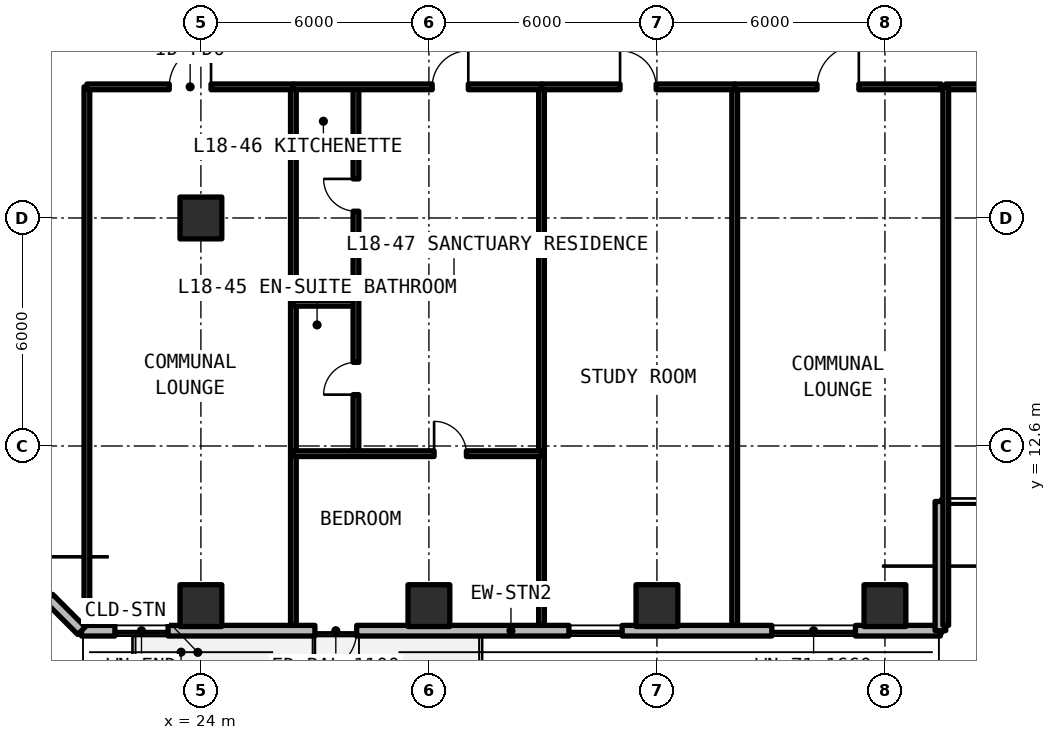
"""IFC4 building model, lengths in metres.
Left out: names, types, materials, properties, quantities, classifications, styles, units other than length and angle.
Written with IfcOpenShell. Run it as: python <this file> out.ifc"""

import sys

from ifc_helpers import new_model, si_unit, direction, frame, frame_2d, origin, origin_2d, place, context, subcontext, project, spatial, rectangle, extrude, element, fill, save


model = new_model("IFC4")
c1 = context("Model", 3, precision=1e-05, world=origin(), true_north=direction((0.0, 1.0)))
c2 = subcontext(c1, "Body", "Model", "MODEL_VIEW")
j1 = project(units=[si_unit("LENGTHUNIT", "METRE"), si_unit("PLANEANGLEUNIT", "RADIAN")], contexts=[c1])
p1 = place(None, origin())
s1 = spatial("IfcSite", under=j1, at=p1, CompositionType="ELEMENT")
p2 = place(p1, origin())
s2 = spatial("IfcBuilding", under=s1, at=p2, CompositionType="ELEMENT")
p3 = place(p2, frame((0.0, 0.0, 66.0)))
s3 = spatial("IfcBuildingStorey", under=s2, at=p3, CompositionType="ELEMENT", Elevation=66.0)
for number, where, z_axis, x_axis in (
    (1, (24.0, 18.6, 0.0), (0.0, 0.0, 1.0), (1.0, 0.0, 0.0)),
    (2, (24.0, 8.4, 0.0), (0.0, 0.0, 1.0), (1.0, 0.0, 0.0)),
    (3, (30.0, 8.4, 0.0), (0.0, 0.0, 1.0), (1.0, 0.0, 0.0)),
    (4, (36.0, 8.4, 0.0), (0.0, 0.0, 1.0), (1.0, 0.0, 0.0)),
    (5, (42.0, 8.4, 0.0), (0.0, 0.0, 1.0), (1.0, 0.0, 0.0)),
):
    element("IfcColumn", number, at=place(p3, frame(where, z_axis=z_axis, x_axis=x_axis)), inside=s3, PredefinedType="COLUMN", context=c2, shape_type="SweptSolid", body=[
        extrude(rectangle(XDim=1.1, YDim=1.1, at=origin_2d()), origin(), (0.0, 0.0, 1.0), 3.63),
    ])
p4 = place(p3, frame((20.858, 7.74, 0.0), z_axis=(0.0, 0.0, 1.0), x_axis=(1.0, 0.0, 0.0)))
e6 = element("IfcWall", 6, at=p4, inside=s3, PredefinedType="SOLIDWALL", context=c2, shape_type="SweptSolid", body=[
    extrude(rectangle(XDim=22.602, YDim=0.28, at=frame_2d((11.301, 0.0))), origin(), (0.0, 0.0, 1.0), 3.41),
])
p5 = place(p4, frame((6.142, 0.0, 0.0)))
e7 = element("IfcOpeningElement", 7, at=p5, cuts=e6, PredefinedType="OPENING", context=c2, shape_type="SweptSolid", body=[
    extrude(rectangle(XDim=1.1, YDim=2.15, at=frame_2d((0.55, 1.075))), frame((0.0, 0.15, 0.0), z_axis=(0.0, -1.0, 0.0), x_axis=(1.0, 0.0, 0.0)), (0.0, 0.0, 1.0), 0.3),
])
p6 = place(p4, frame((0.879, 0.0, 0.78)))
e8 = element("IfcOpeningElement", 8, at=p6, cuts=e6, PredefinedType="OPENING", context=c2, shape_type="SweptSolid", body=[
    extrude(rectangle(XDim=1.4, YDim=1.65, at=frame_2d((0.7, 0.825))), frame((0.0, 0.15, 0.0), z_axis=(0.0, -1.0, 0.0), x_axis=(1.0, 0.0, 0.0)), (0.0, 0.0, 1.0), 0.3),
])
p7 = place(p4, frame((12.827, 0.0, 0.78)))
e9 = element("IfcOpeningElement", 9, at=p7, cuts=e6, PredefinedType="OPENING", context=c2, shape_type="SweptSolid", body=[
    extrude(rectangle(XDim=1.4, YDim=1.65, at=frame_2d((0.7, 0.825))), frame((0.0, 0.15, 0.0), z_axis=(0.0, -1.0, 0.0), x_axis=(1.0, 0.0, 0.0)), (0.0, 0.0, 1.0), 0.3),
])
p8 = place(p4, frame((18.165, 0.0, 0.78)))
e10 = element("IfcOpeningElement", 10, at=p8, cuts=e6, PredefinedType="OPENING", context=c2, shape_type="SweptSolid", body=[
    extrude(rectangle(XDim=2.2, YDim=1.66, at=frame_2d((1.1, 0.83))), frame((0.0, 0.15, 0.0), z_axis=(0.0, -1.0, 0.0), x_axis=(1.0, 0.0, 0.0)), (0.0, 0.0, 1.0), 0.3),
])
p9 = place(p3, frame((43.46, 7.74, 0.0), z_axis=(0.0, 0.0, 1.0), x_axis=(0.0, 1.0, 0.0)))
e11 = element("IfcWall", 11, at=p9, inside=s3, PredefinedType="SOLIDWALL", context=c2, shape_type="SweptSolid", body=[
    extrude(rectangle(XDim=3.4, YDim=0.28, at=frame_2d((1.7, 0.0))), origin(), (0.0, 0.0, 1.0), 3.41),
])
p10 = place(p3, frame((16.74, 11.858, 0.0), z_axis=(0.0, 0.0, 1.0), x_axis=(0.707106781187, -0.707106781187, 0.0)))
e12 = element("IfcWall", 12, at=p10, inside=s3, PredefinedType="SOLIDWALL", context=c2, shape_type="SweptSolid", body=[
    extrude(rectangle(XDim=5.824, YDim=0.28, at=frame_2d((2.912, 0.0))), origin(), (0.0, 0.0, 1.0), 3.41),
])
p11 = place(p10, frame((1.212, 0.0, 0.78)))
e13 = element("IfcOpeningElement", 13, at=p11, cuts=e12, PredefinedType="OPENING", context=c2, shape_type="SweptSolid", body=[
    extrude(rectangle(XDim=3.4, YDim=1.66, at=frame_2d((1.7, 0.83))), frame((0.0, 0.15, 0.0), z_axis=(0.0, -1.0, 0.0), x_axis=(1.0, 0.0, 0.0)), (0.0, 0.0, 1.0), 0.3),
])
p12 = place(p3, frame((43.6, 22.05, 0.0), z_axis=(0.0, 0.0, 1.0), x_axis=(1.0, 0.0, 0.0)))
e14 = element("IfcWall", 14, at=p12, inside=s3, PredefinedType="SOLIDWALL", context=c2, shape_type="SweptSolid", body=[
    extrude(rectangle(XDim=8.4, YDim=0.15, at=frame_2d((4.2, 0.0))), origin(), (0.0, 0.0, 1.0), 2.63),
])
p13 = place(p12, frame((3.65, 0.0, 0.0)))
e15 = element("IfcOpeningElement", 15, at=p13, cuts=e14, PredefinedType="OPENING", context=c2, shape_type="SweptSolid", body=[
    extrude(rectangle(XDim=1.1, YDim=2.15, at=frame_2d((0.55, 1.075))), frame((0.0, 0.085, 0.0), z_axis=(0.0, -1.0, 0.0), x_axis=(1.0, 0.0, 0.0)), (0.0, 0.0, 1.0), 0.17),
])
for number, where, z_axis, x_axis in (
    (16, (43.6, 7.88, 0.0), (0.0, 0.0, 1.0), (0.0, 1.0, 0.0)),
    (17, (21.0, 7.88, 0.0), (0.0, 0.0, 1.0), (0.0, 1.0, 0.0)),
    (18, (26.434, 7.88, 0.0), (0.0, 0.0, 1.0), (0.0, 1.0, 0.0)),
):
    element("IfcWall", number, at=place(p3, frame(where, z_axis=z_axis, x_axis=x_axis)), inside=s3, PredefinedType="SOLIDWALL", context=c2, shape_type="SweptSolid", body=[
        extrude(rectangle(XDim=14.17, YDim=0.15, at=frame_2d((7.085, 0.0))), origin(), (0.0, 0.0, 1.0), 2.63),
    ])
p14 = place(p3, frame((21.0, 22.05, 0.0), z_axis=(0.0, 0.0, 1.0), x_axis=(1.0, 0.0, 0.0)))
e19 = element("IfcWall", 19, at=p14, inside=s3, PredefinedType="SOLIDWALL", context=c2, shape_type="SweptSolid", body=[
    extrude(rectangle(XDim=5.434, YDim=0.15, at=frame_2d((2.717, 0.0))), origin(), (0.0, 0.0, 1.0), 2.63),
])
p15 = place(p14, frame((2.167, 0.0, 0.0)))
e20 = element("IfcOpeningElement", 20, at=p15, cuts=e19, PredefinedType="OPENING", context=c2, shape_type="SweptSolid", body=[
    extrude(rectangle(XDim=1.1, YDim=2.15, at=frame_2d((0.55, 1.075))), frame((0.0, 0.085, 0.0), z_axis=(0.0, -1.0, 0.0), x_axis=(1.0, 0.0, 0.0)), (0.0, 0.0, 1.0), 0.17),
])
p16 = place(p3, frame((32.963, 7.88, 0.0), z_axis=(0.0, 0.0, 1.0), x_axis=(0.0, 1.0, 0.0)))
e21 = element("IfcWall", 21, at=p16, inside=s3, PredefinedType="SOLIDWALL", context=c2, shape_type="SweptSolid", body=[
    extrude(rectangle(XDim=14.17, YDim=0.15, at=frame_2d((7.085, 0.0))), origin(), (0.0, 0.0, 1.0), 2.63),
])
p17 = place(p3, frame((26.434, 16.355, 0.0), z_axis=(0.0, 0.0, 1.0), x_axis=(1.0, 0.0, 0.0)))
e22 = element("IfcWall", 22, at=p17, inside=s3, PredefinedType="PARTITIONING", context=c2, shape_type="SweptSolid", body=[
    extrude(rectangle(XDim=1.646, YDim=0.15, at=frame_2d((0.823, 0.0))), origin(), (0.0, 0.0, 1.0), 2.63),
])
p18 = place(p3, frame((28.08, 12.398, 0.0), z_axis=(0.0, 0.0, 1.0), x_axis=(0.0, 1.0, 0.0)))
e23 = element("IfcWall", 23, at=p18, inside=s3, PredefinedType="PARTITIONING", context=c2, shape_type="SweptSolid", body=[
    extrude(rectangle(XDim=9.652, YDim=0.15, at=frame_2d((4.826, 0.0))), origin(), (0.0, 0.0, 1.0), 2.63),
])
p19 = place(p18, frame((1.554, 0.0, 0.0)))
e24 = element("IfcOpeningElement", 24, at=p19, cuts=e23, PredefinedType="OPENING", context=c2, shape_type="SweptSolid", body=[
    extrude(rectangle(XDim=0.85, YDim=2.1, at=frame_2d((0.425, 1.05))), frame((0.0, 0.085, 0.0), z_axis=(0.0, -1.0, 0.0), x_axis=(1.0, 0.0, 0.0)), (0.0, 0.0, 1.0), 0.17),
])
p20 = place(p18, frame((6.38, 0.0, 0.0)))
e25 = element("IfcOpeningElement", 25, at=p20, cuts=e23, PredefinedType="OPENING", context=c2, shape_type="SweptSolid", body=[
    extrude(rectangle(XDim=0.85, YDim=2.1, at=frame_2d((0.425, 1.05))), frame((0.0, 0.085, 0.0), z_axis=(0.0, -1.0, 0.0), x_axis=(1.0, 0.0, 0.0)), (0.0, 0.0, 1.0), 0.17),
])
p21 = place(p3, frame((26.434, 12.398, 0.0), z_axis=(0.0, 0.0, 1.0), x_axis=(1.0, 0.0, 0.0)))
e26 = element("IfcWall", 26, at=p21, inside=s3, PredefinedType="PARTITIONING", context=c2, shape_type="SweptSolid", body=[
    extrude(rectangle(XDim=6.529, YDim=0.15, at=frame_2d((3.265, 0.0))), origin(), (0.0, 0.0, 1.0), 2.63),
])
p22 = place(p21, frame((3.703, 0.0, 0.0)))
e27 = element("IfcOpeningElement", 27, at=p22, cuts=e26, PredefinedType="OPENING", context=c2, shape_type="SweptSolid", body=[
    extrude(rectangle(XDim=0.85, YDim=2.1, at=frame_2d((0.425, 1.05))), frame((0.0, 0.085, 0.0), z_axis=(0.0, -1.0, 0.0), x_axis=(1.0, 0.0, 0.0)), (0.0, 0.0, 1.0), 0.17),
])
p23 = place(p3, frame((26.434, 22.05, 0.0), z_axis=(0.0, 0.0, 1.0), x_axis=(1.0, 0.0, 0.0)))
e28 = element("IfcWall", 28, at=p23, inside=s3, PredefinedType="SOLIDWALL", context=c2, shape_type="SweptSolid", body=[
    extrude(rectangle(XDim=6.529, YDim=0.15, at=frame_2d((3.265, 0.0))), origin(), (0.0, 0.0, 1.0), 2.63),
])
p24 = place(p23, frame((3.653, 0.0, 0.0)))
e29 = element("IfcOpeningElement", 29, at=p24, cuts=e28, PredefinedType="OPENING", context=c2, shape_type="SweptSolid", body=[
    extrude(rectangle(XDim=0.95, YDim=2.15, at=frame_2d((0.475, 1.075))), frame((0.0, 0.085, 0.0), z_axis=(0.0, -1.0, 0.0), x_axis=(1.0, 0.0, 0.0)), (0.0, 0.0, 1.0), 0.17),
])
p25 = place(p3, frame((38.046, 7.88, 0.0), z_axis=(0.0, 0.0, 1.0), x_axis=(0.0, 1.0, 0.0)))
e30 = element("IfcWall", 30, at=p25, inside=s3, PredefinedType="SOLIDWALL", context=c2, shape_type="SweptSolid", body=[
    extrude(rectangle(XDim=14.17, YDim=0.15, at=frame_2d((7.085, 0.0))), origin(), (0.0, 0.0, 1.0), 2.63),
])
p26 = place(p3, frame((32.963, 22.05, 0.0), z_axis=(0.0, 0.0, 1.0), x_axis=(1.0, 0.0, 0.0)))
e31 = element("IfcWall", 31, at=p26, inside=s3, PredefinedType="SOLIDWALL", context=c2, shape_type="SweptSolid", body=[
    extrude(rectangle(XDim=5.083, YDim=0.15, at=frame_2d((2.542, 0.0))), origin(), (0.0, 0.0, 1.0), 2.63),
])
p27 = place(p26, frame((2.067, 0.0, 0.0)))
e32 = element("IfcOpeningElement", 32, at=p27, cuts=e31, PredefinedType="OPENING", context=c2, shape_type="SweptSolid", body=[
    extrude(rectangle(XDim=0.95, YDim=2.15, at=frame_2d((0.475, 1.075))), frame((0.0, 0.085, 0.0), z_axis=(0.0, -1.0, 0.0), x_axis=(1.0, 0.0, 0.0)), (0.0, 0.0, 1.0), 0.17),
])
p28 = place(p3, frame((38.046, 22.05, 0.0), z_axis=(0.0, 0.0, 1.0), x_axis=(1.0, 0.0, 0.0)))
e33 = element("IfcWall", 33, at=p28, inside=s3, PredefinedType="SOLIDWALL", context=c2, shape_type="SweptSolid", body=[
    extrude(rectangle(XDim=5.434, YDim=0.15, at=frame_2d((2.717, 0.0))), origin(), (0.0, 0.0, 1.0), 2.63),
])
p29 = place(p28, frame((2.167, 0.0, 0.0)))
e34 = element("IfcOpeningElement", 34, at=p29, cuts=e33, PredefinedType="OPENING", context=c2, shape_type="SweptSolid", body=[
    extrude(rectangle(XDim=1.1, YDim=2.15, at=frame_2d((0.55, 1.075))), frame((0.0, 0.085, 0.0), z_axis=(0.0, -1.0, 0.0), x_axis=(1.0, 0.0, 0.0)), (0.0, 0.0, 1.0), 0.17),
])
p30 = place(p5, frame((1.1, 0.0, 0.0), z_axis=(0.0, 0.0, 1.0), x_axis=(-1.0, 0.0, 0.0)))
e35 = element("IfcDoor", 35, at=p30, inside=s3, OperationType="SINGLE_SWING_RIGHT", PredefinedType="DOOR", context=c2, shape_type="SweptSolid", body=[
    extrude(rectangle(XDim=1.1, YDim=2.15, at=frame_2d((0.55, 1.075))), frame((0.0, 0.025, 0.0), z_axis=(0.0, -1.0, 0.0), x_axis=(1.0, 0.0, 0.0)), (0.0, 0.0, 1.0), 0.05),
])
fill(e7, e35)
p31 = place(p6, origin())
e36 = element("IfcWindow", 36, at=p31, inside=s3, PartitioningType="SINGLE_PANEL", PredefinedType="WINDOW", context=c2, shape_type="SweptSolid", body=[
    extrude(rectangle(XDim=1.4, YDim=1.65, at=frame_2d((0.7, 0.825))), frame((0.0, 0.03, 0.0), z_axis=(0.0, -1.0, 0.0), x_axis=(1.0, 0.0, 0.0)), (0.0, 0.0, 1.0), 0.06),
])
fill(e8, e36)
p32 = place(p7, origin())
e37 = element("IfcWindow", 37, at=p32, inside=s3, PartitioningType="SINGLE_PANEL", PredefinedType="WINDOW", context=c2, shape_type="SweptSolid", body=[
    extrude(rectangle(XDim=1.4, YDim=1.65, at=frame_2d((0.7, 0.825))), frame((0.0, 0.03, 0.0), z_axis=(0.0, -1.0, 0.0), x_axis=(1.0, 0.0, 0.0)), (0.0, 0.0, 1.0), 0.06),
])
fill(e9, e37)
p33 = place(p8, origin())
e38 = element("IfcWindow", 38, at=p33, inside=s3, PartitioningType="SINGLE_PANEL", PredefinedType="WINDOW", context=c2, shape_type="SweptSolid", body=[
    extrude(rectangle(XDim=2.2, YDim=1.66, at=frame_2d((1.1, 0.83))), frame((0.0, 0.03, 0.0), z_axis=(0.0, -1.0, 0.0), x_axis=(1.0, 0.0, 0.0)), (0.0, 0.0, 1.0), 0.06),
])
fill(e10, e38)
p34 = place(p15, origin())
e39 = element("IfcDoor", 39, at=p34, inside=s3, OperationType="SINGLE_SWING_RIGHT", PredefinedType="DOOR", context=c2, shape_type="SweptSolid", body=[
    extrude(rectangle(XDim=1.1, YDim=2.15, at=frame_2d((0.55, 1.075))), frame((0.0, 0.025, 0.0), z_axis=(0.0, -1.0, 0.0), x_axis=(1.0, 0.0, 0.0)), (0.0, 0.0, 1.0), 0.05),
])
fill(e20, e39)
p35 = place(p19, origin())
e40 = element("IfcDoor", 40, at=p35, inside=s3, OperationType="SINGLE_SWING_LEFT", PredefinedType="DOOR", context=c2, shape_type="SweptSolid", body=[
    extrude(rectangle(XDim=0.85, YDim=2.1, at=frame_2d((0.425, 1.05))), frame((0.0, 0.025, 0.0), z_axis=(0.0, -1.0, 0.0), x_axis=(1.0, 0.0, 0.0)), (0.0, 0.0, 1.0), 0.05),
])
fill(e24, e40)
p36 = place(p20, origin())
e41 = element("IfcDoor", 41, at=p36, inside=s3, OperationType="SINGLE_SWING_RIGHT", PredefinedType="DOOR", context=c2, shape_type="SweptSolid", body=[
    extrude(rectangle(XDim=0.85, YDim=2.1, at=frame_2d((0.425, 1.05))), frame((0.0, 0.025, 0.0), z_axis=(0.0, -1.0, 0.0), x_axis=(1.0, 0.0, 0.0)), (0.0, 0.0, 1.0), 0.05),
])
fill(e25, e41)
p37 = place(p22, origin())
e42 = element("IfcDoor", 42, at=p37, inside=s3, OperationType="SINGLE_SWING_LEFT", PredefinedType="DOOR", context=c2, shape_type="SweptSolid", body=[
    extrude(rectangle(XDim=0.85, YDim=2.1, at=frame_2d((0.425, 1.05))), frame((0.0, 0.025, 0.0), z_axis=(0.0, -1.0, 0.0), x_axis=(1.0, 0.0, 0.0)), (0.0, 0.0, 1.0), 0.05),
])
fill(e27, e42)
p38 = place(p24, origin())
e43 = element("IfcDoor", 43, at=p38, inside=s3, OperationType="SINGLE_SWING_RIGHT", PredefinedType="DOOR", context=c2, shape_type="SweptSolid", body=[
    extrude(rectangle(XDim=0.95, YDim=2.15, at=frame_2d((0.475, 1.075))), frame((0.0, 0.025, 0.0), z_axis=(0.0, -1.0, 0.0), x_axis=(1.0, 0.0, 0.0)), (0.0, 0.0, 1.0), 0.05),
])
fill(e29, e43)
p39 = place(p27, origin())
e44 = element("IfcDoor", 44, at=p39, inside=s3, OperationType="SINGLE_SWING_LEFT", PredefinedType="DOOR", context=c2, shape_type="SweptSolid", body=[
    extrude(rectangle(XDim=0.95, YDim=2.15, at=frame_2d((0.475, 1.075))), frame((0.0, 0.025, 0.0), z_axis=(0.0, -1.0, 0.0), x_axis=(1.0, 0.0, 0.0)), (0.0, 0.0, 1.0), 0.05),
])
fill(e32, e44)
p40 = place(p29, origin())
e45 = element("IfcDoor", 45, at=p40, inside=s3, OperationType="SINGLE_SWING_RIGHT", PredefinedType="DOOR", context=c2, shape_type="SweptSolid", body=[
    extrude(rectangle(XDim=1.1, YDim=2.15, at=frame_2d((0.55, 1.075))), frame((0.0, 0.025, 0.0), z_axis=(0.0, -1.0, 0.0), x_axis=(1.0, 0.0, 0.0)), (0.0, 0.0, 1.0), 0.05),
])
fill(e34, e45)
save(model, sys.argv[1])
